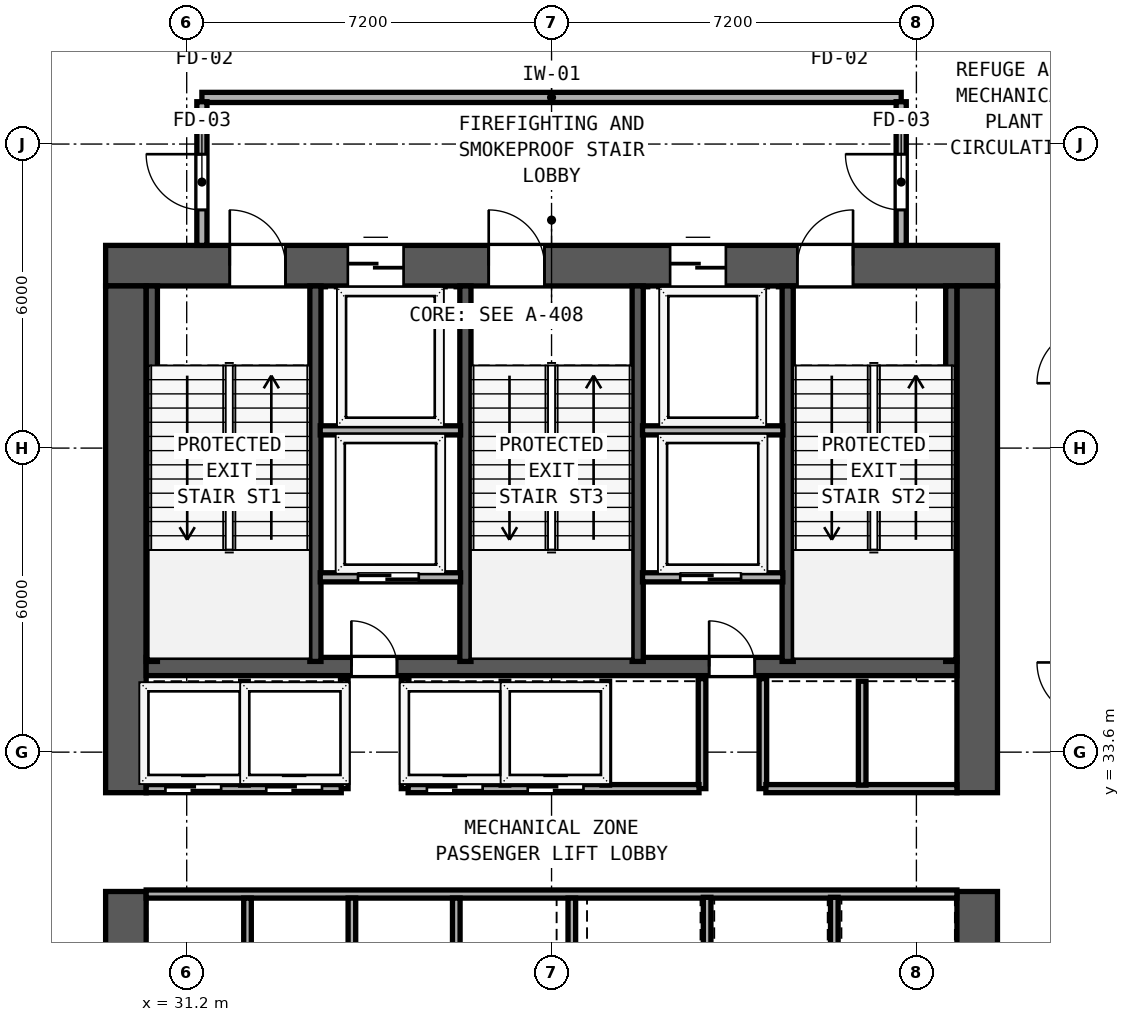
"""IFC4 building model, lengths in metres.
Left out: names, types, materials, properties, quantities, classifications, styles, units other than length and angle.
Written with IfcOpenShell. Run it as: python <this file> out.ifc"""

import sys

from ifc_helpers import new_model, si_unit, direction, frame, frame_2d, origin, place, context, subcontext, project, spatial, rectangle, extrude, element, fill, save


model = new_model("IFC4")
c1 = context("Model", 3, precision=1e-05, world=origin(), true_north=direction((0.0, 1.0)))
c2 = subcontext(c1, "Body", "Model", "MODEL_VIEW")
j1 = project(units=[si_unit("LENGTHUNIT", "METRE"), si_unit("PLANEANGLEUNIT", "RADIAN")], contexts=[c1])
p1 = place(None, origin())
s1 = spatial("IfcSite", under=j1, at=p1, CompositionType="ELEMENT")
p2 = place(p1, origin())
s2 = spatial("IfcBuilding", under=s1, at=p2, CompositionType="ELEMENT")
p3 = place(p2, frame((0.0, 0.0, 89.4)))
s3 = spatial("IfcBuildingStorey", under=s2, at=p3, CompositionType="ELEMENT", Elevation=89.4)
p4 = place(p3, frame((29.6, 43.2, 0.0), z_axis=(0.0, 0.0, 1.0), x_axis=(1.0, 0.0, 0.0)))
e1 = element("IfcWall", 1, at=p4, inside=s3, PredefinedType="SHEAR", context=c2, shape_type="SweptSolid", body=[
    extrude(rectangle(XDim=17.6, YDim=0.8, at=frame_2d((8.8, 0.0))), origin(), (0.0, 0.0, 1.0), 4.35),
])
p5 = place(p4, frame((2.45, 0.0, 0.0)))
e2 = element("IfcOpeningElement", 2, at=p5, cuts=e1, PredefinedType="OPENING", context=c2, shape_type="SweptSolid", body=[
    extrude(rectangle(XDim=1.1, YDim=2.15, at=frame_2d((0.55, 1.075))), frame((0.0, 0.41, 0.0), z_axis=(0.0, -1.0, 0.0), x_axis=(1.0, 0.0, 0.0)), (0.0, 0.0, 1.0), 0.82),
])
p6 = place(p4, frame((7.56, 0.0, 0.0)))
e3 = element("IfcOpeningElement", 3, at=p6, cuts=e1, PredefinedType="OPENING", context=c2, shape_type="SweptSolid", body=[
    extrude(rectangle(XDim=1.1, YDim=2.15, at=frame_2d((0.55, 1.075))), frame((0.0, 0.41, 0.0), z_axis=(0.0, -1.0, 0.0), x_axis=(1.0, 0.0, 0.0)), (0.0, 0.0, 1.0), 0.82),
])
p7 = place(p4, frame((13.65, 0.0, 0.0)))
e4 = element("IfcOpeningElement", 4, at=p7, cuts=e1, PredefinedType="OPENING", context=c2, shape_type="SweptSolid", body=[
    extrude(rectangle(XDim=1.1, YDim=2.15, at=frame_2d((0.55, 1.075))), frame((0.0, 0.41, 0.0), z_axis=(0.0, -1.0, 0.0), x_axis=(1.0, 0.0, 0.0)), (0.0, 0.0, 1.0), 0.82),
])
p8 = place(p4, frame((4.78, 0.0, 0.0)))
e5 = element("IfcOpeningElement", 5, at=p8, cuts=e1, PredefinedType="OPENING", context=c2, shape_type="SweptSolid", body=[
    extrude(rectangle(XDim=1.1, YDim=2.2, at=frame_2d((0.55, 1.1))), frame((0.0, 0.41, 0.0), z_axis=(0.0, -1.0, 0.0), x_axis=(1.0, 0.0, 0.0)), (0.0, 0.0, 1.0), 0.82),
])
p9 = place(p4, frame((11.14, 0.0, 0.0)))
e6 = element("IfcOpeningElement", 6, at=p9, cuts=e1, PredefinedType="OPENING", context=c2, shape_type="SweptSolid", body=[
    extrude(rectangle(XDim=1.1, YDim=2.2, at=frame_2d((0.55, 1.1))), frame((0.0, 0.41, 0.0), z_axis=(0.0, -1.0, 0.0), x_axis=(1.0, 0.0, 0.0)), (0.0, 0.0, 1.0), 0.82),
])
p10 = place(p3, frame((30.0, 26.8, 0.0), z_axis=(0.0, 0.0, 1.0), x_axis=(0.0, 1.0, 0.0)))
e7 = element("IfcWall", 7, at=p10, inside=s3, PredefinedType="SHEAR", context=c2, shape_type="SweptSolid", body=[
    extrude(rectangle(XDim=4.05, YDim=0.8, at=frame_2d((2.025, 0.0))), origin(), (0.0, 0.0, 1.0), 4.35),
])
p11 = place(p3, frame((30.0, 32.8, 0.0), z_axis=(0.0, 0.0, 1.0), x_axis=(0.0, 1.0, 0.0)))
e8 = element("IfcWall", 8, at=p11, inside=s3, PredefinedType="SHEAR", context=c2, shape_type="SweptSolid", body=[
    extrude(rectangle(XDim=10.0, YDim=0.8, at=frame_2d((5.0, 0.0))), origin(), (0.0, 0.0, 1.0), 4.35),
])
p12 = place(p3, frame((46.8, 26.8, 0.0), z_axis=(0.0, 0.0, 1.0), x_axis=(0.0, 1.0, 0.0)))
e9 = element("IfcWall", 9, at=p12, inside=s3, PredefinedType="SHEAR", context=c2, shape_type="SweptSolid", body=[
    extrude(rectangle(XDim=4.05, YDim=0.8, at=frame_2d((2.025, 0.0))), origin(), (0.0, 0.0, 1.0), 4.35),
])
p13 = place(p3, frame((46.8, 32.8, 0.0), z_axis=(0.0, 0.0, 1.0), x_axis=(0.0, 1.0, 0.0)))
e10 = element("IfcWall", 10, at=p13, inside=s3, PredefinedType="SHEAR", context=c2, shape_type="SweptSolid", body=[
    extrude(rectangle(XDim=10.0, YDim=0.8, at=frame_2d((5.0, 0.0))), origin(), (0.0, 0.0, 1.0), 4.35),
])
p14 = place(p3, frame((30.4, 35.29, 0.0), z_axis=(0.0, 0.0, 1.0), x_axis=(1.0, 0.0, 0.0)))
e11 = element("IfcWall", 11, at=p14, inside=s3, PredefinedType="SHEAR", context=c2, shape_type="SweptSolid", body=[
    extrude(rectangle(XDim=16.0, YDim=0.36, at=frame_2d((8.0, 0.0))), origin(), (0.0, 0.0, 1.0), 4.35),
])
p15 = place(p14, frame((4.95, 0.0, 0.0), z_axis=(0.0, 0.0, 1.0), x_axis=(-1.0, 0.0, 0.0)))
e12 = element("IfcOpeningElement", 12, at=p15, cuts=e11, PredefinedType="OPENING", context=c2, shape_type="SweptSolid", body=[
    extrude(rectangle(XDim=0.9, YDim=2.1, at=frame_2d((0.45, 1.05))), frame((0.0, 0.19, 0.0), z_axis=(0.0, -1.0, 0.0), x_axis=(1.0, 0.0, 0.0)), (0.0, 0.0, 1.0), 0.38),
])
p16 = place(p14, frame((12.01, 0.0, 0.0), z_axis=(0.0, 0.0, 1.0), x_axis=(-1.0, 0.0, 0.0)))
e13 = element("IfcOpeningElement", 13, at=p16, cuts=e11, PredefinedType="OPENING", context=c2, shape_type="SweptSolid", body=[
    extrude(rectangle(XDim=0.9, YDim=2.1, at=frame_2d((0.45, 1.05))), frame((0.0, 0.19, 0.0), z_axis=(0.0, -1.0, 0.0), x_axis=(1.0, 0.0, 0.0)), (0.0, 0.0, 1.0), 0.38),
])
for number, where, z_axis, x_axis in (
    (14, (30.512, 35.39, 0.0), (0.0, 0.0, 1.0), (0.0, 1.0, 0.0)),
    (15, (33.74, 35.39, 0.0), (0.0, 0.0, 1.0), (0.0, 1.0, 0.0)),
    (16, (36.7, 35.39, 0.0), (0.0, 0.0, 1.0), (0.0, 1.0, 0.0)),
    (17, (40.1, 35.39, 0.0), (0.0, 0.0, 1.0), (0.0, 1.0, 0.0)),
    (18, (43.06, 35.39, 0.0), (0.0, 0.0, 1.0), (0.0, 1.0, 0.0)),
    (19, (46.288, 35.39, 0.0), (0.0, 0.0, 1.0), (0.0, 1.0, 0.0)),
):
    element("IfcWall", number, at=place(p3, frame(where, z_axis=z_axis, x_axis=x_axis)), inside=s3, PredefinedType="SHEAR", context=c2, shape_type="SweptSolid", body=[
        extrude(rectangle(XDim=7.41, YDim=0.22, at=frame_2d((3.705, 0.0))), origin(), (0.0, 0.0, 1.0), 4.35),
    ])
p17 = place(p3, frame((31.5, 46.52, 0.0), z_axis=(0.0, 0.0, 1.0), x_axis=(1.0, 0.0, 0.0)))
e20 = element("IfcWall", 20, at=p17, inside=s3, PredefinedType="SOLIDWALL", context=c2, shape_type="SweptSolid", body=[
    extrude(rectangle(XDim=13.8, YDim=0.2, at=frame_2d((6.9, 0.0))), origin(), (0.0, 0.0, 1.0), 4.35),
])
p18 = place(p3, frame((31.5, 43.6, 0.0), z_axis=(0.0, 0.0, 1.0), x_axis=(0.0, 1.0, 0.0)))
e21 = element("IfcWall", 21, at=p18, inside=s3, PredefinedType="SOLIDWALL", context=c2, shape_type="SweptSolid", body=[
    extrude(rectangle(XDim=2.835, YDim=0.2, at=frame_2d((1.417, 0.0))), origin(), (0.0, 0.0, 1.0), 4.35),
])
p19 = place(p18, frame((1.8, 0.0, 0.0), z_axis=(0.0, 0.0, 1.0), x_axis=(-1.0, 0.0, 0.0)))
e22 = element("IfcOpeningElement", 22, at=p19, cuts=e21, PredefinedType="OPENING", context=c2, shape_type="SweptSolid", body=[
    extrude(rectangle(XDim=1.1, YDim=2.15, at=frame_2d((0.55, 1.075))), frame((0.0, 0.11, 0.0), z_axis=(0.0, -1.0, 0.0), x_axis=(1.0, 0.0, 0.0)), (0.0, 0.0, 1.0), 0.22),
])
p20 = place(p3, frame((45.3, 43.6, 0.0), z_axis=(0.0, 0.0, 1.0), x_axis=(0.0, 1.0, 0.0)))
e23 = element("IfcWall", 23, at=p20, inside=s3, PredefinedType="SOLIDWALL", context=c2, shape_type="SweptSolid", body=[
    extrude(rectangle(XDim=2.835, YDim=0.2, at=frame_2d((1.417, 0.0))), origin(), (0.0, 0.0, 1.0), 4.35),
])
p21 = place(p20, frame((0.7, 0.0, 0.0)))
e24 = element("IfcOpeningElement", 24, at=p21, cuts=e23, PredefinedType="OPENING", context=c2, shape_type="SweptSolid", body=[
    extrude(rectangle(XDim=1.1, YDim=2.15, at=frame_2d((0.55, 1.075))), frame((0.0, 0.11, 0.0), z_axis=(0.0, -1.0, 0.0), x_axis=(1.0, 0.0, 0.0)), (0.0, 0.0, 1.0), 0.22),
])
for number, where, z_axis, x_axis in (
    (25, (33.835, 39.95, 0.0), (0.0, 0.0, 1.0), (1.0, 0.0, 0.0)),
    (26, (40.195, 39.95, 0.0), (0.0, 0.0, 1.0), (1.0, 0.0, 0.0)),
):
    element("IfcWall", number, at=place(p3, frame(where, z_axis=z_axis, x_axis=x_axis)), inside=s3, PredefinedType="SOLIDWALL", context=c2, shape_type="SweptSolid", body=[
        extrude(rectangle(XDim=2.77, YDim=0.18, at=frame_2d((1.385, 0.0))), origin(), (0.0, 0.0, 1.0), 4.35),
    ])
p22 = place(p3, frame((33.835, 37.05, 0.0), z_axis=(0.0, 0.0, 1.0), x_axis=(1.0, 0.0, 0.0)))
e27 = element("IfcWall", 27, at=p22, inside=s3, PredefinedType="SOLIDWALL", context=c2, shape_type="SweptSolid", body=[
    extrude(rectangle(XDim=2.77, YDim=0.18, at=frame_2d((1.385, 0.0))), origin(), (0.0, 0.0, 1.0), 4.35),
])
p23 = place(p22, frame((1.945, 0.0, 0.0), z_axis=(0.0, 0.0, 1.0), x_axis=(-1.0, 0.0, 0.0)))
e28 = element("IfcOpeningElement", 28, at=p23, cuts=e27, PredefinedType="OPENING", context=c2, shape_type="SweptSolid", body=[
    extrude(rectangle(XDim=1.2, YDim=2.2, at=frame_2d((0.6, 1.1))), frame((0.0, 0.1, 0.0), z_axis=(0.0, -1.0, 0.0), x_axis=(1.0, 0.0, 0.0)), (0.0, 0.0, 1.0), 0.2),
])
for number, where, z_axis, x_axis in (
    (29, (34.31, 32.88, 0.0), (0.0, 0.0, 1.0), (0.0, 1.0, 0.0)),
    (30, (35.51, 32.88, 0.0), (0.0, 0.0, 1.0), (0.0, 1.0, 0.0)),
):
    element("IfcWall", number, at=place(p3, frame(where, z_axis=z_axis, x_axis=x_axis)), inside=s3, PredefinedType="SOLIDWALL", context=c2, shape_type="SweptSolid", body=[
        extrude(rectangle(XDim=2.17, YDim=0.15, at=frame_2d((1.085, 0.0))), origin(), (0.0, 0.0, 1.0), 4.35),
    ])
p24 = place(p3, frame((40.195, 37.05, 0.0), z_axis=(0.0, 0.0, 1.0), x_axis=(1.0, 0.0, 0.0)))
e31 = element("IfcWall", 31, at=p24, inside=s3, PredefinedType="SOLIDWALL", context=c2, shape_type="SweptSolid", body=[
    extrude(rectangle(XDim=2.77, YDim=0.18, at=frame_2d((1.385, 0.0))), origin(), (0.0, 0.0, 1.0), 4.35),
])
p25 = place(p24, frame((1.945, 0.0, 0.0), z_axis=(0.0, 0.0, 1.0), x_axis=(-1.0, 0.0, 0.0)))
e32 = element("IfcOpeningElement", 32, at=p25, cuts=e31, PredefinedType="OPENING", context=c2, shape_type="SweptSolid", body=[
    extrude(rectangle(XDim=1.2, YDim=2.2, at=frame_2d((0.6, 1.1))), frame((0.0, 0.1, 0.0), z_axis=(0.0, -1.0, 0.0), x_axis=(1.0, 0.0, 0.0)), (0.0, 0.0, 1.0), 0.2),
])
for number, where, z_axis, x_axis in (
    (33, (41.37, 32.88, 0.0), (0.0, 0.0, 1.0), (0.0, 1.0, 0.0)),
    (34, (42.57, 32.88, 0.0), (0.0, 0.0, 1.0), (0.0, 1.0, 0.0)),
):
    element("IfcWall", number, at=place(p3, frame(where, z_axis=z_axis, x_axis=x_axis)), inside=s3, PredefinedType="SOLIDWALL", context=c2, shape_type="SweptSolid", body=[
        extrude(rectangle(XDim=2.17, YDim=0.15, at=frame_2d((1.085, 0.0))), origin(), (0.0, 0.0, 1.0), 4.35),
    ])
p26 = place(p3, frame((30.4, 32.88, 0.0), z_axis=(0.0, 0.0, 1.0), x_axis=(1.0, 0.0, 0.0)))
e35 = element("IfcWall", 35, at=p26, inside=s3, PredefinedType="SOLIDWALL", context=c2, shape_type="SweptSolid", body=[
    extrude(rectangle(XDim=3.85, YDim=0.16, at=frame_2d((1.925, 0.0))), origin(), (0.0, 0.0, 1.0), 4.35),
])
p27 = place(p26, frame((1.48, 0.0, 0.0), z_axis=(0.0, 0.0, 1.0), x_axis=(-1.0, 0.0, 0.0)))
e36 = element("IfcOpeningElement", 36, at=p27, cuts=e35, PredefinedType="OPENING", context=c2, shape_type="SweptSolid", body=[
    extrude(rectangle(XDim=1.1, YDim=2.2, at=frame_2d((0.55, 1.1))), frame((0.0, 0.09, 0.0), z_axis=(0.0, -1.0, 0.0), x_axis=(1.0, 0.0, 0.0)), (0.0, 0.0, 1.0), 0.18),
])
p28 = place(p26, frame((3.47, 0.0, 0.0), z_axis=(0.0, 0.0, 1.0), x_axis=(-1.0, 0.0, 0.0)))
e37 = element("IfcOpeningElement", 37, at=p28, cuts=e35, PredefinedType="OPENING", context=c2, shape_type="SweptSolid", body=[
    extrude(rectangle(XDim=1.1, YDim=2.2, at=frame_2d((0.55, 1.1))), frame((0.0, 0.09, 0.0), z_axis=(0.0, -1.0, 0.0), x_axis=(1.0, 0.0, 0.0)), (0.0, 0.0, 1.0), 0.18),
])
p29 = place(p3, frame((35.57, 32.88, 0.0), z_axis=(0.0, 0.0, 1.0), x_axis=(1.0, 0.0, 0.0)))
e38 = element("IfcWall", 38, at=p29, inside=s3, PredefinedType="SOLIDWALL", context=c2, shape_type="SweptSolid", body=[
    extrude(rectangle(XDim=5.74, YDim=0.16, at=frame_2d((2.87, 0.0))), origin(), (0.0, 0.0, 1.0), 4.35),
])
p30 = place(p29, frame((1.47, 0.0, 0.0), z_axis=(0.0, 0.0, 1.0), x_axis=(-1.0, 0.0, 0.0)))
e39 = element("IfcOpeningElement", 39, at=p30, cuts=e38, PredefinedType="OPENING", context=c2, shape_type="SweptSolid", body=[
    extrude(rectangle(XDim=1.1, YDim=2.2, at=frame_2d((0.55, 1.1))), frame((0.0, 0.09, 0.0), z_axis=(0.0, -1.0, 0.0), x_axis=(1.0, 0.0, 0.0)), (0.0, 0.0, 1.0), 0.18),
])
p31 = place(p29, frame((3.46, 0.0, 0.0), z_axis=(0.0, 0.0, 1.0), x_axis=(-1.0, 0.0, 0.0)))
e40 = element("IfcOpeningElement", 40, at=p31, cuts=e38, PredefinedType="OPENING", context=c2, shape_type="SweptSolid", body=[
    extrude(rectangle(XDim=1.1, YDim=2.2, at=frame_2d((0.55, 1.1))), frame((0.0, 0.09, 0.0), z_axis=(0.0, -1.0, 0.0), x_axis=(1.0, 0.0, 0.0)), (0.0, 0.0, 1.0), 0.18),
])
p32 = place(p3, frame((42.63, 32.88, 0.0), z_axis=(0.0, 0.0, 1.0), x_axis=(1.0, 0.0, 0.0)))
e41 = element("IfcWall", 41, at=p32, inside=s3, PredefinedType="SOLIDWALL", context=c2, shape_type="SweptSolid", body=[
    extrude(rectangle(XDim=3.77, YDim=0.16, at=frame_2d((1.885, 0.0))), origin(), (0.0, 0.0, 1.0), 4.35),
])
for number, where, z_axis, x_axis in (
    (42, (32.34, 32.95, 0.0), (0.0, 0.0, 1.0), (0.0, 1.0, 0.0)),
    (43, (37.48, 32.95, 0.0), (0.0, 0.0, 1.0), (0.0, 1.0, 0.0)),
    (44, (39.47, 32.95, 0.0), (0.0, 0.0, 1.0), (0.0, 1.0, 0.0)),
    (45, (44.53, 32.95, 0.0), (0.0, 0.0, 1.0), (0.0, 1.0, 0.0)),
):
    element("IfcWall", number, at=place(p3, frame(where, z_axis=z_axis, x_axis=x_axis)), inside=s3, PredefinedType="SOLIDWALL", context=c2, shape_type="SweptSolid", body=[
        extrude(rectangle(XDim=2.05, YDim=0.15, at=frame_2d((1.025, 0.0))), origin(), (0.0, 0.0, 1.0), 4.35),
    ])
p33 = place(p3, frame((30.4, 30.8, 0.0), z_axis=(0.0, 0.0, 1.0), x_axis=(1.0, 0.0, 0.0)))
e46 = element("IfcWall", 46, at=p33, inside=s3, PredefinedType="SOLIDWALL", context=c2, shape_type="SweptSolid", body=[
    extrude(rectangle(XDim=16.0, YDim=0.16, at=frame_2d((8.0, 0.0))), origin(), (0.0, 0.0, 1.0), 4.35),
])
for number, where, z_axis, x_axis in (
    (47, (32.4, 28.735, 0.0), (0.0, 0.0, 1.0), (0.0, 1.0, 0.0)),
    (48, (34.46, 28.735, 0.0), (0.0, 0.0, 1.0), (0.0, 1.0, 0.0)),
    (49, (36.52, 28.735, 0.0), (0.0, 0.0, 1.0), (0.0, 1.0, 0.0)),
    (50, (38.8, 28.735, 0.0), (0.0, 0.0, 1.0), (0.0, 1.0, 0.0)),
):
    element("IfcWall", number, at=place(p3, frame(where, z_axis=z_axis, x_axis=x_axis)), inside=s3, PredefinedType="SOLIDWALL", context=c2, shape_type="SweptSolid", body=[
        extrude(rectangle(XDim=1.985, YDim=0.15, at=frame_2d((0.992, 0.0))), origin(), (0.0, 0.0, 1.0), 4.35),
    ])
for number, where, z_axis, x_axis in (
    (51, (41.47, 28.75, 0.0), (0.0, 0.0, 1.0), (0.0, 1.0, 0.0)),
    (52, (43.98, 28.75, 0.0), (0.0, 0.0, 1.0), (0.0, 1.0, 0.0)),
):
    element("IfcWall", number, at=place(p3, frame(where, z_axis=z_axis, x_axis=x_axis)), inside=s3, PredefinedType="SOLIDWALL", context=c2, shape_type="SweptSolid", body=[
        extrude(rectangle(XDim=1.985, YDim=0.15, at=frame_2d((0.993, 0.0))), origin(), (0.0, 0.0, 1.0), 4.35),
    ])
p34 = place(p5, origin())
e53 = element("IfcDoor", 53, at=p34, inside=s3, OperationType="SINGLE_SWING_LEFT", PredefinedType="DOOR", context=c2, shape_type="SweptSolid", body=[
    extrude(rectangle(XDim=1.1, YDim=2.15, at=frame_2d((0.55, 1.075))), frame((0.0, 0.185, 0.0), z_axis=(0.0, -1.0, 0.0), x_axis=(1.0, 0.0, 0.0)), (0.0, 0.0, 1.0), 0.05),
])
fill(e2, e53)
p35 = place(p6, origin())
e54 = element("IfcDoor", 54, at=p35, inside=s3, OperationType="SINGLE_SWING_LEFT", PredefinedType="DOOR", context=c2, shape_type="SweptSolid", body=[
    extrude(rectangle(XDim=1.1, YDim=2.15, at=frame_2d((0.55, 1.075))), frame((0.0, 0.185, 0.0), z_axis=(0.0, -1.0, 0.0), x_axis=(1.0, 0.0, 0.0)), (0.0, 0.0, 1.0), 0.05),
])
fill(e3, e54)
p36 = place(p7, origin())
e55 = element("IfcDoor", 55, at=p36, inside=s3, OperationType="SINGLE_SWING_RIGHT", PredefinedType="DOOR", context=c2, shape_type="SweptSolid", body=[
    extrude(rectangle(XDim=1.1, YDim=2.15, at=frame_2d((0.55, 1.075))), frame((0.0, 0.185, 0.0), z_axis=(0.0, -1.0, 0.0), x_axis=(1.0, 0.0, 0.0)), (0.0, 0.0, 1.0), 0.05),
])
fill(e4, e55)
p37 = place(p19, origin())
e56 = element("IfcDoor", 56, at=p37, inside=s3, OperationType="SINGLE_SWING_LEFT", PredefinedType="DOOR", context=c2, shape_type="SweptSolid", body=[
    extrude(rectangle(XDim=1.1, YDim=2.15, at=frame_2d((0.55, 1.075))), frame((0.0, 0.025, 0.0), z_axis=(0.0, -1.0, 0.0), x_axis=(1.0, 0.0, 0.0)), (0.0, 0.0, 1.0), 0.05),
])
fill(e22, e56)
p38 = place(p21, origin())
e57 = element("IfcDoor", 57, at=p38, inside=s3, OperationType="SINGLE_SWING_RIGHT", PredefinedType="DOOR", context=c2, shape_type="SweptSolid", body=[
    extrude(rectangle(XDim=1.1, YDim=2.15, at=frame_2d((0.55, 1.075))), frame((0.0, 0.025, 0.0), z_axis=(0.0, -1.0, 0.0), x_axis=(1.0, 0.0, 0.0)), (0.0, 0.0, 1.0), 0.05),
])
fill(e24, e57)
p39 = place(p8, origin())
e58 = element("IfcDoor", 58, at=p39, inside=s3, OperationType="SLIDING_TO_LEFT", PredefinedType="DOOR", context=c2, shape_type="SweptSolid", body=[
    extrude(rectangle(XDim=1.1, YDim=2.2, at=frame_2d((0.55, 1.1))), frame((0.0, 0.185, 0.0), z_axis=(0.0, -1.0, 0.0), x_axis=(1.0, 0.0, 0.0)), (0.0, 0.0, 1.0), 0.05),
])
fill(e5, e58)
p40 = place(p9, origin())
e59 = element("IfcDoor", 59, at=p40, inside=s3, OperationType="SLIDING_TO_LEFT", PredefinedType="DOOR", context=c2, shape_type="SweptSolid", body=[
    extrude(rectangle(XDim=1.1, YDim=2.2, at=frame_2d((0.55, 1.1))), frame((0.0, 0.185, 0.0), z_axis=(0.0, -1.0, 0.0), x_axis=(1.0, 0.0, 0.0)), (0.0, 0.0, 1.0), 0.05),
])
fill(e6, e59)
p41 = place(p23, origin())
e60 = element("IfcDoor", 60, at=p41, inside=s3, OperationType="SLIDING_TO_RIGHT", PredefinedType="DOOR", context=c2, shape_type="SweptSolid", body=[
    extrude(rectangle(XDim=1.2, YDim=2.2, at=frame_2d((0.6, 1.1))), frame((0.0, 0.025, 0.0), z_axis=(0.0, -1.0, 0.0), x_axis=(1.0, 0.0, 0.0)), (0.0, 0.0, 1.0), 0.05),
])
fill(e28, e60)
p42 = place(p15, origin())
e61 = element("IfcDoor", 61, at=p42, inside=s3, OperationType="SINGLE_SWING_RIGHT", PredefinedType="DOOR", context=c2, shape_type="SweptSolid", body=[
    extrude(rectangle(XDim=0.9, YDim=2.1, at=frame_2d((0.45, 1.05))), frame((0.0, 0.025, 0.0), z_axis=(0.0, -1.0, 0.0), x_axis=(1.0, 0.0, 0.0)), (0.0, 0.0, 1.0), 0.05),
])
fill(e12, e61)
p43 = place(p25, origin())
e62 = element("IfcDoor", 62, at=p43, inside=s3, OperationType="SLIDING_TO_RIGHT", PredefinedType="DOOR", context=c2, shape_type="SweptSolid", body=[
    extrude(rectangle(XDim=1.2, YDim=2.2, at=frame_2d((0.6, 1.1))), frame((0.0, 0.025, 0.0), z_axis=(0.0, -1.0, 0.0), x_axis=(1.0, 0.0, 0.0)), (0.0, 0.0, 1.0), 0.05),
])
fill(e32, e62)
p44 = place(p16, origin())
e63 = element("IfcDoor", 63, at=p44, inside=s3, OperationType="SINGLE_SWING_RIGHT", PredefinedType="DOOR", context=c2, shape_type="SweptSolid", body=[
    extrude(rectangle(XDim=0.9, YDim=2.1, at=frame_2d((0.45, 1.05))), frame((0.0, 0.025, 0.0), z_axis=(0.0, -1.0, 0.0), x_axis=(1.0, 0.0, 0.0)), (0.0, 0.0, 1.0), 0.05),
])
fill(e13, e63)
p45 = place(p27, origin())
e64 = element("IfcDoor", 64, at=p45, inside=s3, OperationType="SLIDING_TO_LEFT", PredefinedType="DOOR", context=c2, shape_type="SweptSolid", body=[
    extrude(rectangle(XDim=1.1, YDim=2.2, at=frame_2d((0.55, 1.1))), frame((0.0, 0.025, 0.0), z_axis=(0.0, -1.0, 0.0), x_axis=(1.0, 0.0, 0.0)), (0.0, 0.0, 1.0), 0.05),
])
fill(e36, e64)
p46 = place(p28, origin())
e65 = element("IfcDoor", 65, at=p46, inside=s3, OperationType="SLIDING_TO_LEFT", PredefinedType="DOOR", context=c2, shape_type="SweptSolid", body=[
    extrude(rectangle(XDim=1.1, YDim=2.2, at=frame_2d((0.55, 1.1))), frame((0.0, 0.025, 0.0), z_axis=(0.0, -1.0, 0.0), x_axis=(1.0, 0.0, 0.0)), (0.0, 0.0, 1.0), 0.05),
])
fill(e37, e65)
p47 = place(p30, origin())
e66 = element("IfcDoor", 66, at=p47, inside=s3, OperationType="SLIDING_TO_LEFT", PredefinedType="DOOR", context=c2, shape_type="SweptSolid", body=[
    extrude(rectangle(XDim=1.1, YDim=2.2, at=frame_2d((0.55, 1.1))), frame((0.0, 0.025, 0.0), z_axis=(0.0, -1.0, 0.0), x_axis=(1.0, 0.0, 0.0)), (0.0, 0.0, 1.0), 0.05),
])
fill(e39, e66)
p48 = place(p31, origin())
e67 = element("IfcDoor", 67, at=p48, inside=s3, OperationType="SLIDING_TO_LEFT", PredefinedType="DOOR", context=c2, shape_type="SweptSolid", body=[
    extrude(rectangle(XDim=1.1, YDim=2.2, at=frame_2d((0.55, 1.1))), frame((0.0, 0.025, 0.0), z_axis=(0.0, -1.0, 0.0), x_axis=(1.0, 0.0, 0.0)), (0.0, 0.0, 1.0), 0.05),
])
fill(e40, e67)
save(model, sys.argv[1])
